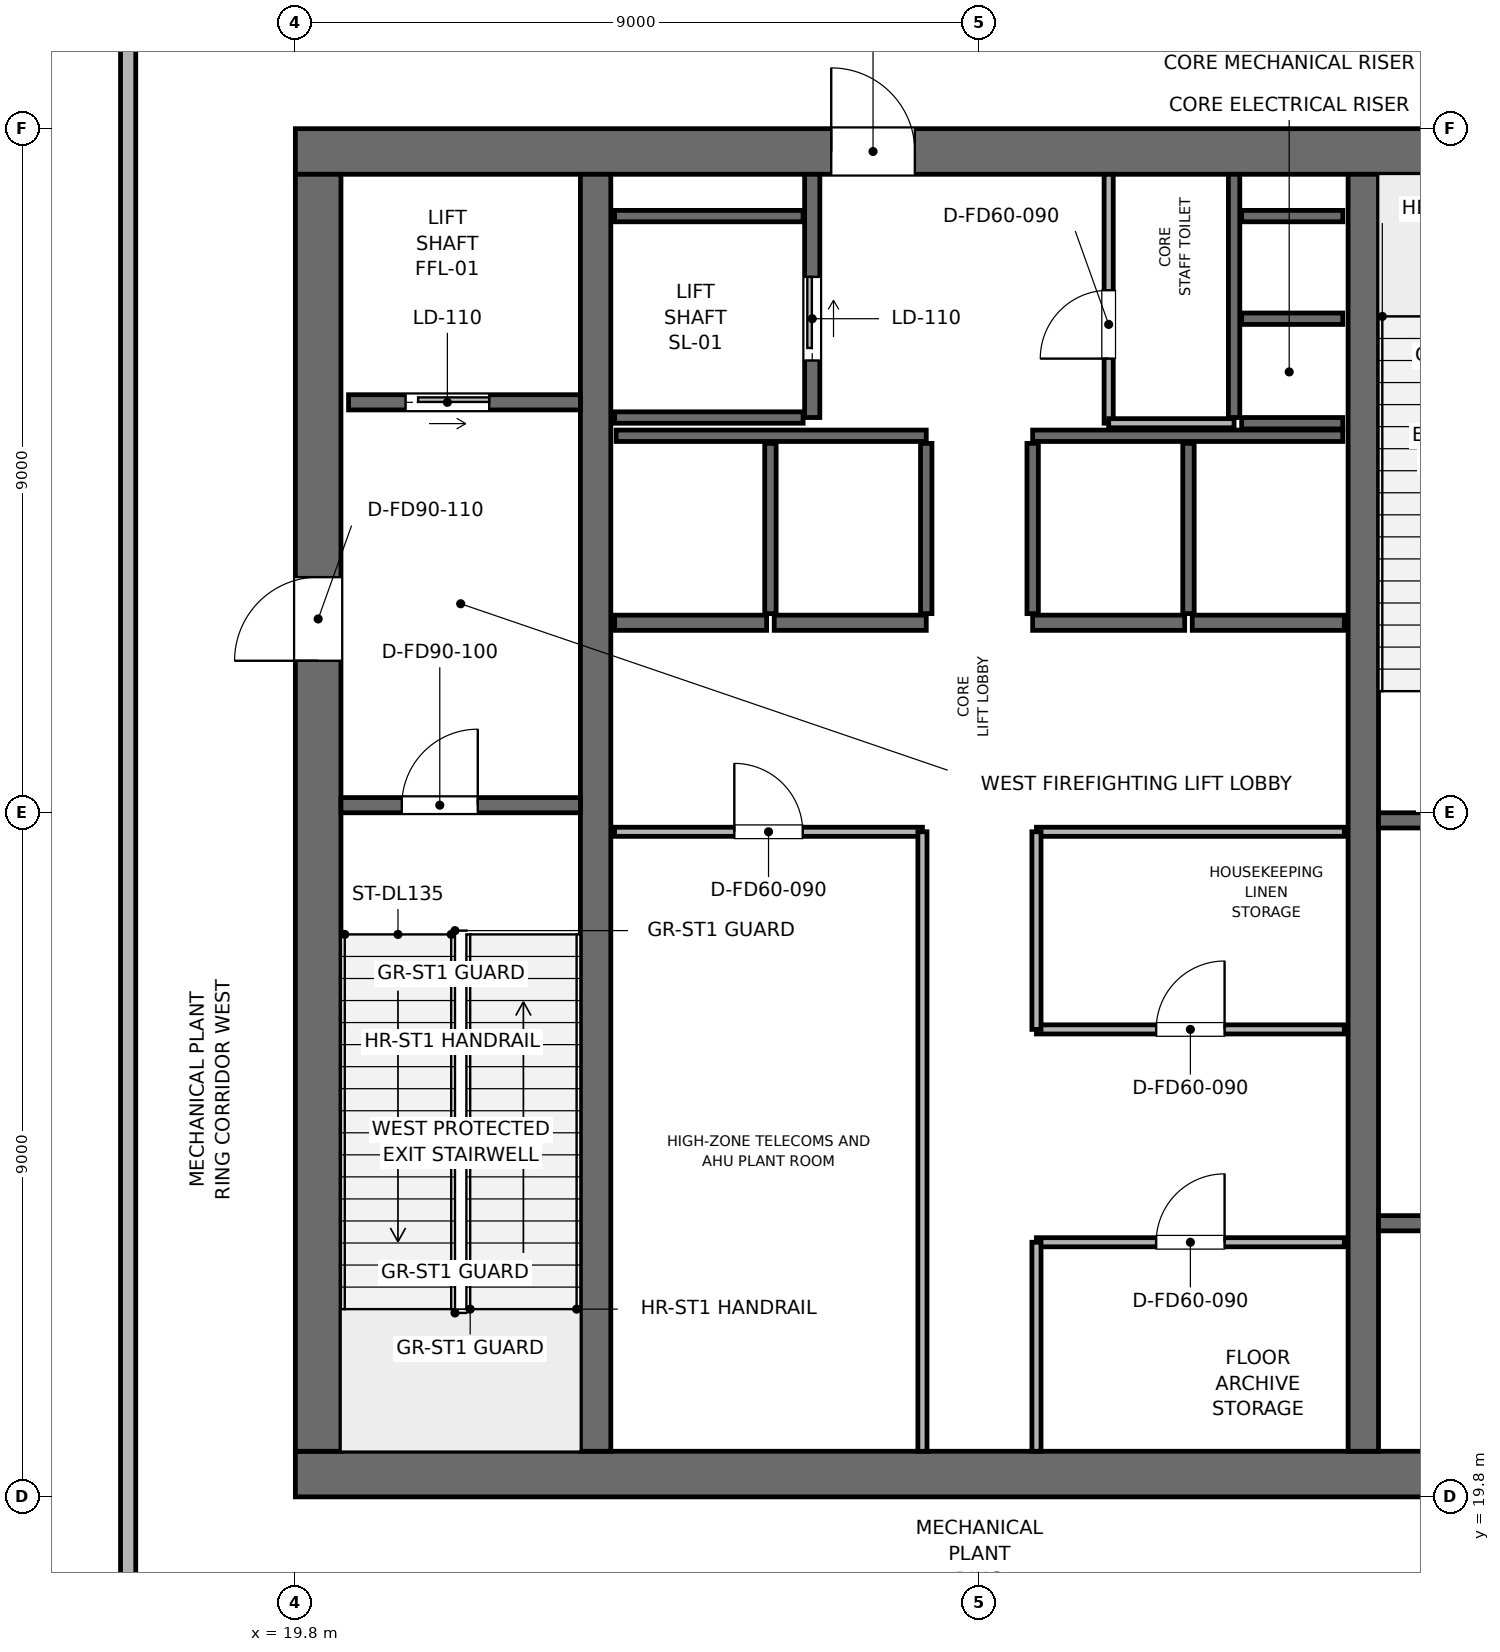
"""IFC4 building model, lengths in metres.
Left out: names, types, materials, properties, quantities, classifications, styles, units other than length and angle.
Written with IfcOpenShell. Run it as: python <this file> out.ifc"""

import sys

from ifc_helpers import new_model, si_unit, direction, frame, frame_2d, origin, place, context, subcontext, project, spatial, rectangle, extrude, element, fill, save


model = new_model("IFC4")
c1 = context("Model", 3, precision=1e-05, world=origin(), true_north=direction((0.0, 1.0)))
c2 = subcontext(c1, "Body", "Model", "MODEL_VIEW")
j1 = project(units=[si_unit("LENGTHUNIT", "METRE"), si_unit("PLANEANGLEUNIT", "RADIAN")], contexts=[c1])
p1 = place(None, origin())
s1 = spatial("IfcSite", under=j1, at=p1, CompositionType="ELEMENT")
p2 = place(p1, origin())
s2 = spatial("IfcBuilding", under=s1, at=p2, CompositionType="ELEMENT")
p3 = place(p2, frame((0.0, 0.0, 289.5)))
s3 = spatial("IfcBuildingStorey", under=s2, at=p3, CompositionType="ELEMENT", Elevation=289.5)
p4 = place(p3, frame((19.8, 20.1, 0.0), z_axis=(0.0, 0.0, 1.0), x_axis=(1.0, 0.0, 0.0)))
e1 = element("IfcWall", 1, at=p4, inside=s3, PredefinedType="SHEAR", context=c2, shape_type="SweptSolid", body=[
    extrude(rectangle(XDim=18.0, YDim=0.6, at=frame_2d((9.0, 0.0))), origin(), (0.0, 0.0, 1.0), 6.0),
])
p5 = place(p3, frame((19.8, 37.5, 0.0), z_axis=(0.0, 0.0, 1.0), x_axis=(1.0, 0.0, 0.0)))
e2 = element("IfcWall", 2, at=p5, inside=s3, PredefinedType="SHEAR", context=c2, shape_type="SweptSolid", body=[
    extrude(rectangle(XDim=18.0, YDim=0.6, at=frame_2d((9.0, 0.0))), origin(), (0.0, 0.0, 1.0), 6.0),
])
p6 = place(p5, frame((7.05, 0.0, 0.0)))
e3 = element("IfcOpeningElement", 3, at=p6, cuts=e2, PredefinedType="OPENING", context=c2, shape_type="SweptSolid", body=[
    extrude(rectangle(XDim=1.1, YDim=2.15, at=frame_2d((0.55, 1.075))), frame((0.0, 0.31, 0.0), z_axis=(0.0, -1.0, 0.0), x_axis=(1.0, 0.0, 0.0)), (0.0, 0.0, 1.0), 0.62),
])
p7 = place(p3, frame((20.1, 20.4, 0.0), z_axis=(0.0, 0.0, 1.0), x_axis=(0.0, 1.0, 0.0)))
e4 = element("IfcWall", 4, at=p7, inside=s3, PredefinedType="SHEAR", context=c2, shape_type="SweptSolid", body=[
    extrude(rectangle(XDim=16.8, YDim=0.6, at=frame_2d((8.4, 0.0))), origin(), (0.0, 0.0, 1.0), 6.0),
])
p8 = place(p7, frame((10.4, 0.0, 0.0)))
e5 = element("IfcOpeningElement", 5, at=p8, cuts=e4, PredefinedType="OPENING", context=c2, shape_type="SweptSolid", body=[
    extrude(rectangle(XDim=1.1, YDim=2.15, at=frame_2d((0.55, 1.075))), frame((0.0, 0.31, 0.0), z_axis=(0.0, -1.0, 0.0), x_axis=(1.0, 0.0, 0.0)), (0.0, 0.0, 1.0), 0.62),
])
for number, where, z_axis, x_axis in (
    (6, (23.75, 20.4, 0.0), (0.0, 0.0, 1.0), (0.0, 1.0, 0.0)),
    (7, (33.85, 20.4, 0.0), (0.0, 0.0, 1.0), (0.0, 1.0, 0.0)),
):
    element("IfcWall", number, at=place(p3, frame(where, z_axis=z_axis, x_axis=x_axis)), inside=s3, PredefinedType="SHEAR", context=c2, shape_type="SweptSolid", body=[
        extrude(rectangle(XDim=16.8, YDim=0.4, at=frame_2d((8.4, 0.0))), origin(), (0.0, 0.0, 1.0), 6.0),
    ])
p9 = place(p3, frame((20.4, 28.9, 0.0), z_axis=(0.0, 0.0, 1.0), x_axis=(1.0, 0.0, 0.0)))
e8 = element("IfcWall", 8, at=p9, inside=s3, PredefinedType="SHEAR", context=c2, shape_type="SweptSolid", body=[
    extrude(rectangle(XDim=3.15, YDim=0.2, at=frame_2d((1.575, 0.0))), origin(), (0.0, 0.0, 1.0), 5.76),
])
p10 = place(p9, frame((0.8, 0.0, 0.0)))
e9 = element("IfcOpeningElement", 9, at=p10, cuts=e8, PredefinedType="OPENING", context=c2, shape_type="SweptSolid", body=[
    extrude(rectangle(XDim=1.0, YDim=2.1, at=frame_2d((0.5, 1.05))), frame((0.0, 0.11, 0.0), z_axis=(0.0, -1.0, 0.0), x_axis=(1.0, 0.0, 0.0)), (0.0, 0.0, 1.0), 0.22),
])
p11 = place(p3, frame((34.05, 28.7, 0.0), z_axis=(0.0, 0.0, 1.0), x_axis=(1.0, 0.0, 0.0)))
e10 = element("IfcWall", 10, at=p11, inside=s3, PredefinedType="SHEAR", context=c2, shape_type="SweptSolid", body=[
    extrude(rectangle(XDim=3.15, YDim=0.2, at=frame_2d((1.575, 0.0))), origin(), (0.0, 0.0, 1.0), 5.76),
])
p12 = place(p11, frame((0.8, 0.0, 0.0)))
e11 = element("IfcOpeningElement", 11, at=p12, cuts=e10, PredefinedType="OPENING", context=c2, shape_type="SweptSolid", body=[
    extrude(rectangle(XDim=1.0, YDim=2.1, at=frame_2d((0.5, 1.05))), frame((0.0, 0.11, 0.0), z_axis=(0.0, -1.0, 0.0), x_axis=(1.0, 0.0, 0.0)), (0.0, 0.0, 1.0), 0.22),
])
p13 = place(p3, frame((32.15, 34.0, 0.0), z_axis=(0.0, 0.0, 1.0), x_axis=(0.0, 1.0, 0.0)))
e12 = element("IfcWall", 12, at=p13, inside=s3, PredefinedType="SHEAR", context=c2, shape_type="SweptSolid", body=[
    extrude(rectangle(XDim=3.2, YDim=0.15, at=frame_2d((1.6, 0.0))), origin(), (0.0, 0.0, 1.0), 5.76),
])
for number, where, z_axis, x_axis in (
    (13, (32.25, 33.925, 0.0), (0.0, 0.0, 1.0), (1.0, 0.0, 0.0)),
    (14, (32.25, 35.3, 0.0), (0.0, 0.0, 1.0), (1.0, 0.0, 0.0)),
):
    element("IfcWall", number, at=place(p3, frame(where, z_axis=z_axis, x_axis=x_axis)), inside=s3, PredefinedType="SHEAR", context=c2, shape_type="SweptSolid", body=[
        extrude(rectangle(XDim=1.33, YDim=0.15, at=frame_2d((0.665, 0.0))), origin(), (0.0, 0.0, 1.0), 5.76),
    ])
p14 = place(p3, frame((20.5, 34.2, 0.0), z_axis=(0.0, 0.0, 1.0), x_axis=(1.0, 0.0, 0.0)))
e15 = element("IfcWall", 15, at=p14, inside=s3, PredefinedType="SHEAR", context=c2, shape_type="SweptSolid", body=[
    extrude(rectangle(XDim=3.05, YDim=0.2, at=frame_2d((1.525, 0.0))), origin(), (0.0, 0.0, 1.0), 5.76),
])
p15 = place(p14, frame((0.75, 0.0, 0.0)))
e16 = element("IfcOpeningElement", 16, at=p15, cuts=e15, PredefinedType="OPENING", context=c2, shape_type="SweptSolid", body=[
    extrude(rectangle(XDim=1.1, YDim=2.15, at=frame_2d((0.55, 1.075))), frame((0.0, 0.11, 0.0), z_axis=(0.0, -1.0, 0.0), x_axis=(1.0, 0.0, 0.0)), (0.0, 0.0, 1.0), 0.22),
])
p16 = place(p3, frame((34.05, 23.4, 0.0), z_axis=(0.0, 0.0, 1.0), x_axis=(1.0, 0.0, 0.0)))
e17 = element("IfcWall", 17, at=p16, inside=s3, PredefinedType="SHEAR", context=c2, shape_type="SweptSolid", body=[
    extrude(rectangle(XDim=3.05, YDim=0.2, at=frame_2d((1.525, 0.0))), origin(), (0.0, 0.0, 1.0), 5.76),
])
p17 = place(p16, frame((1.2, 0.0, 0.0)))
e18 = element("IfcOpeningElement", 18, at=p17, cuts=e17, PredefinedType="OPENING", context=c2, shape_type="SweptSolid", body=[
    extrude(rectangle(XDim=1.1, YDim=2.15, at=frame_2d((0.55, 1.075))), frame((0.0, 0.11, 0.0), z_axis=(0.0, -1.0, 0.0), x_axis=(1.0, 0.0, 0.0)), (0.0, 0.0, 1.0), 0.22),
])
p18 = place(p3, frame((26.6, 34.0, 0.0), z_axis=(0.0, 0.0, 1.0), x_axis=(0.0, 1.0, 0.0)))
e19 = element("IfcWall", 19, at=p18, inside=s3, PredefinedType="SHEAR", context=c2, shape_type="SweptSolid", body=[
    extrude(rectangle(XDim=3.2, YDim=0.2, at=frame_2d((1.6, 0.0))), origin(), (0.0, 0.0, 1.0), 5.76),
])
p19 = place(p18, frame((0.75, 0.0, 0.0)))
e20 = element("IfcOpeningElement", 20, at=p19, cuts=e19, PredefinedType="OPENING", context=c2, shape_type="SweptSolid", body=[
    extrude(rectangle(XDim=1.1, YDim=2.15, at=frame_2d((0.55, 1.075))), frame((0.0, 0.11, 0.0), z_axis=(0.0, -1.0, 0.0), x_axis=(1.0, 0.0, 0.0)), (0.0, 0.0, 1.0), 0.22),
])
for number, where, z_axis, x_axis in (
    (21, (24.0, 34.0, 0.0), (0.0, 0.0, 1.0), (1.0, 0.0, 0.0)),
    (22, (24.0, 36.65, 0.0), (0.0, 0.0, 1.0), (1.0, 0.0, 0.0)),
):
    element("IfcWall", number, at=place(p3, frame(where, z_axis=z_axis, x_axis=x_axis)), inside=s3, PredefinedType="SHEAR", context=c2, shape_type="SweptSolid", body=[
        extrude(rectangle(XDim=2.48, YDim=0.15, at=frame_2d((1.24, 0.0))), origin(), (0.0, 0.0, 1.0), 5.76),
    ])
for number, where, z_axis, x_axis in (
    (23, (24.0, 31.3, 0.0), (0.0, 0.0, 1.0), (1.0, 0.0, 0.0)),
    (24, (26.1, 31.3, 0.0), (0.0, 0.0, 1.0), (1.0, 0.0, 0.0)),
    (25, (29.5, 31.3, 0.0), (0.0, 0.0, 1.0), (1.0, 0.0, 0.0)),
    (26, (31.6, 31.3, 0.0), (0.0, 0.0, 1.0), (1.0, 0.0, 0.0)),
):
    element("IfcWall", number, at=place(p3, frame(where, z_axis=z_axis, x_axis=x_axis)), inside=s3, PredefinedType="SHEAR", context=c2, shape_type="SweptSolid", body=[
        extrude(rectangle(XDim=2.0, YDim=0.2, at=frame_2d((1.0, 0.0))), origin(), (0.0, 0.0, 1.0), 5.76),
    ])
p20 = place(p3, frame((32.25, 36.65, 0.0), z_axis=(0.0, 0.0, 1.0), x_axis=(1.0, 0.0, 0.0)))
e27 = element("IfcWall", 27, at=p20, inside=s3, PredefinedType="SHEAR", context=c2, shape_type="SweptSolid", body=[
    extrude(rectangle(XDim=1.33, YDim=0.15, at=frame_2d((0.665, 0.0))), origin(), (0.0, 0.0, 1.0), 5.76),
])
for number, where, z_axis, x_axis in (
    (28, (24.02, 33.76, 0.0), (0.0, 0.0, 1.0), (1.0, 0.0, 0.0)),
    (29, (29.5, 33.76, 0.0), (0.0, 0.0, 1.0), (1.0, 0.0, 0.0)),
):
    element("IfcWall", number, at=place(p3, frame(where, z_axis=z_axis, x_axis=x_axis)), inside=s3, PredefinedType="SHEAR", context=c2, shape_type="SweptSolid", body=[
        extrude(rectangle(XDim=4.08, YDim=0.15, at=frame_2d((2.04, 0.0))), origin(), (0.0, 0.0, 1.0), 5.76),
    ])
for number, where, z_axis, x_axis in (
    (30, (26.05, 31.42, 0.0), (0.0, 0.0, 1.0), (0.0, 1.0, 0.0)),
    (31, (28.1, 31.42, 0.0), (0.0, 0.0, 1.0), (0.0, 1.0, 0.0)),
    (32, (29.5, 31.42, 0.0), (0.0, 0.0, 1.0), (0.0, 1.0, 0.0)),
    (33, (31.55, 31.42, 0.0), (0.0, 0.0, 1.0), (0.0, 1.0, 0.0)),
):
    element("IfcWall", number, at=place(p3, frame(where, z_axis=z_axis, x_axis=x_axis)), inside=s3, PredefinedType="SHEAR", context=c2, shape_type="SweptSolid", body=[
        extrude(rectangle(XDim=2.24, YDim=0.15, at=frame_2d((1.12, 0.0))), origin(), (0.0, 0.0, 1.0), 5.76),
    ])
p21 = place(p3, frame((30.5, 33.925, 0.0), z_axis=(0.0, 0.0, 1.0), x_axis=(0.0, 1.0, 0.0)))
e34 = element("IfcWall", 34, at=p21, inside=s3, PredefinedType="PARTITIONING", context=c2, shape_type="SweptSolid", body=[
    extrude(rectangle(XDim=3.275, YDim=0.12, at=frame_2d((1.637, 0.0))), origin(), (0.0, 0.0, 1.0), 5.76),
])
p22 = place(p21, frame((0.85, 0.0, 0.0)))
e35 = element("IfcOpeningElement", 35, at=p22, cuts=e34, PredefinedType="OPENING", context=c2, shape_type="SweptSolid", body=[
    extrude(rectangle(XDim=0.9, YDim=2.1, at=frame_2d((0.45, 1.05))), frame((0.0, 0.07, 0.0), z_axis=(0.0, -1.0, 0.0), x_axis=(1.0, 0.0, 0.0)), (0.0, 0.0, 1.0), 0.14),
])
p23 = place(p3, frame((30.5, 33.925, 0.0), z_axis=(0.0, 0.0, 1.0), x_axis=(1.0, 0.0, 0.0)))
e36 = element("IfcWall", 36, at=p23, inside=s3, PredefinedType="PARTITIONING", context=c2, shape_type="SweptSolid", body=[
    extrude(rectangle(XDim=1.65, YDim=0.12, at=frame_2d((0.825, 0.0))), origin(), (0.0, 0.0, 1.0), 5.76),
])
p24 = place(p3, frame((24.0, 28.55, 0.0), z_axis=(0.0, 0.0, 1.0), x_axis=(1.0, 0.0, 0.0)))
e37 = element("IfcWall", 37, at=p24, inside=s3, PredefinedType="PARTITIONING", context=c2, shape_type="SweptSolid", body=[
    extrude(rectangle(XDim=4.05, YDim=0.12, at=frame_2d((2.025, 0.0))), origin(), (0.0, 0.0, 1.0), 5.76),
])
p25 = place(p24, frame((1.575, 0.0, 0.0)))
e38 = element("IfcOpeningElement", 38, at=p25, cuts=e37, PredefinedType="OPENING", context=c2, shape_type="SweptSolid", body=[
    extrude(rectangle(XDim=0.9, YDim=2.1, at=frame_2d((0.45, 1.05))), frame((0.0, 0.07, 0.0), z_axis=(0.0, -1.0, 0.0), x_axis=(1.0, 0.0, 0.0)), (0.0, 0.0, 1.0), 0.14),
])
p26 = place(p3, frame((28.05, 20.4, 0.0), z_axis=(0.0, 0.0, 1.0), x_axis=(0.0, 1.0, 0.0)))
e39 = element("IfcWall", 39, at=p26, inside=s3, PredefinedType="PARTITIONING", context=c2, shape_type="SweptSolid", body=[
    extrude(rectangle(XDim=8.15, YDim=0.12, at=frame_2d((4.075, 0.0))), origin(), (0.0, 0.0, 1.0), 5.76),
])
p27 = place(p3, frame((29.55, 23.15, 0.0), z_axis=(0.0, 0.0, 1.0), x_axis=(1.0, 0.0, 0.0)))
e40 = element("IfcWall", 40, at=p27, inside=s3, PredefinedType="PARTITIONING", context=c2, shape_type="SweptSolid", body=[
    extrude(rectangle(XDim=4.05, YDim=0.12, at=frame_2d((2.025, 0.0))), origin(), (0.0, 0.0, 1.0), 5.76),
])
p28 = place(p27, frame((1.575, 0.0, 0.0)))
e41 = element("IfcOpeningElement", 41, at=p28, cuts=e40, PredefinedType="OPENING", context=c2, shape_type="SweptSolid", body=[
    extrude(rectangle(XDim=0.9, YDim=2.1, at=frame_2d((0.45, 1.05))), frame((0.0, 0.07, 0.0), z_axis=(0.0, -1.0, 0.0), x_axis=(1.0, 0.0, 0.0)), (0.0, 0.0, 1.0), 0.14),
])
p29 = place(p3, frame((29.55, 20.4, 0.0), z_axis=(0.0, 0.0, 1.0), x_axis=(0.0, 1.0, 0.0)))
e42 = element("IfcWall", 42, at=p29, inside=s3, PredefinedType="PARTITIONING", context=c2, shape_type="SweptSolid", body=[
    extrude(rectangle(XDim=2.75, YDim=0.12, at=frame_2d((1.375, 0.0))), origin(), (0.0, 0.0, 1.0), 5.76),
])
p30 = place(p3, frame((29.55, 25.95, 0.0), z_axis=(0.0, 0.0, 1.0), x_axis=(1.0, 0.0, 0.0)))
e43 = element("IfcWall", 43, at=p30, inside=s3, PredefinedType="PARTITIONING", context=c2, shape_type="SweptSolid", body=[
    extrude(rectangle(XDim=4.05, YDim=0.12, at=frame_2d((2.025, 0.0))), origin(), (0.0, 0.0, 1.0), 5.76),
])
p31 = place(p30, frame((1.575, 0.0, 0.0)))
e44 = element("IfcOpeningElement", 44, at=p31, cuts=e43, PredefinedType="OPENING", context=c2, shape_type="SweptSolid", body=[
    extrude(rectangle(XDim=0.9, YDim=2.1, at=frame_2d((0.45, 1.05))), frame((0.0, 0.07, 0.0), z_axis=(0.0, -1.0, 0.0), x_axis=(1.0, 0.0, 0.0)), (0.0, 0.0, 1.0), 0.14),
])
p32 = place(p3, frame((29.55, 28.55, 0.0), z_axis=(0.0, 0.0, 1.0), x_axis=(1.0, 0.0, 0.0)))
e45 = element("IfcWall", 45, at=p32, inside=s3, PredefinedType="PARTITIONING", context=c2, shape_type="SweptSolid", body=[
    extrude(rectangle(XDim=4.05, YDim=0.12, at=frame_2d((2.025, 0.0))), origin(), (0.0, 0.0, 1.0), 5.76),
])
p33 = place(p3, frame((29.55, 25.95, 0.0), z_axis=(0.0, 0.0, 1.0), x_axis=(0.0, 1.0, 0.0)))
e46 = element("IfcWall", 46, at=p33, inside=s3, PredefinedType="PARTITIONING", context=c2, shape_type="SweptSolid", body=[
    extrude(rectangle(XDim=2.6, YDim=0.12, at=frame_2d((1.3, 0.0))), origin(), (0.0, 0.0, 1.0), 5.76),
])
p34 = place(p3, frame((17.6, 17.6, 0.0), z_axis=(0.0, 0.0, 1.0), x_axis=(0.0, 1.0, 0.0)))
e47 = element("IfcWall", 47, at=p34, inside=s3, PredefinedType="PARTITIONING", context=c2, shape_type="SweptSolid", body=[
    extrude(rectangle(XDim=22.4, YDim=0.2, at=frame_2d((11.2, 0.0))), origin(), (0.0, 0.0, 1.0), 5.345),
])
p35 = place(p10, origin())
e48 = element("IfcDoor", 48, at=p35, inside=s3, OperationType="SINGLE_SWING_RIGHT", PredefinedType="DOOR", context=c2, shape_type="SweptSolid", body=[
    extrude(rectangle(XDim=1.0, YDim=2.1, at=frame_2d((0.5, 1.05))), frame((0.0, 0.025, 0.0), z_axis=(0.0, -1.0, 0.0), x_axis=(1.0, 0.0, 0.0)), (0.0, 0.0, 1.0), 0.05),
])
fill(e9, e48)
p36 = place(p15, origin())
e49 = element("IfcDoor", 49, at=p36, inside=s3, OperationType="SLIDING_TO_RIGHT", PredefinedType="DOOR", context=c2, shape_type="SweptSolid", body=[
    extrude(rectangle(XDim=1.1, YDim=2.15, at=frame_2d((0.55, 1.075))), frame((0.0, 0.025, 0.0), z_axis=(0.0, -1.0, 0.0), x_axis=(1.0, 0.0, 0.0)), (0.0, 0.0, 1.0), 0.05),
])
fill(e16, e49)
p37 = place(p19, origin())
e50 = element("IfcDoor", 50, at=p37, inside=s3, OperationType="SLIDING_TO_RIGHT", PredefinedType="DOOR", context=c2, shape_type="SweptSolid", body=[
    extrude(rectangle(XDim=1.1, YDim=2.15, at=frame_2d((0.55, 1.075))), frame((0.0, 0.025, 0.0), z_axis=(0.0, -1.0, 0.0), x_axis=(1.0, 0.0, 0.0)), (0.0, 0.0, 1.0), 0.05),
])
fill(e20, e50)
p38 = place(p22, origin())
e51 = element("IfcDoor", 51, at=p38, inside=s3, OperationType="SINGLE_SWING_LEFT", PredefinedType="DOOR", context=c2, shape_type="SweptSolid", body=[
    extrude(rectangle(XDim=0.9, YDim=2.1, at=frame_2d((0.45, 1.05))), frame((0.0, 0.025, 0.0), z_axis=(0.0, -1.0, 0.0), x_axis=(1.0, 0.0, 0.0)), (0.0, 0.0, 1.0), 0.05),
])
fill(e35, e51)
p39 = place(p25, origin())
e52 = element("IfcDoor", 52, at=p39, inside=s3, OperationType="SINGLE_SWING_LEFT", PredefinedType="DOOR", context=c2, shape_type="SweptSolid", body=[
    extrude(rectangle(XDim=0.9, YDim=2.1, at=frame_2d((0.45, 1.05))), frame((0.0, 0.025, 0.0), z_axis=(0.0, -1.0, 0.0), x_axis=(1.0, 0.0, 0.0)), (0.0, 0.0, 1.0), 0.05),
])
fill(e38, e52)
p40 = place(p28, origin())
e53 = element("IfcDoor", 53, at=p40, inside=s3, OperationType="SINGLE_SWING_RIGHT", PredefinedType="DOOR", context=c2, shape_type="SweptSolid", body=[
    extrude(rectangle(XDim=0.9, YDim=2.1, at=frame_2d((0.45, 1.05))), frame((0.0, 0.025, 0.0), z_axis=(0.0, -1.0, 0.0), x_axis=(1.0, 0.0, 0.0)), (0.0, 0.0, 1.0), 0.05),
])
fill(e41, e53)
p41 = place(p31, origin())
e54 = element("IfcDoor", 54, at=p41, inside=s3, OperationType="SINGLE_SWING_RIGHT", PredefinedType="DOOR", context=c2, shape_type="SweptSolid", body=[
    extrude(rectangle(XDim=0.9, YDim=2.1, at=frame_2d((0.45, 1.05))), frame((0.0, 0.025, 0.0), z_axis=(0.0, -1.0, 0.0), x_axis=(1.0, 0.0, 0.0)), (0.0, 0.0, 1.0), 0.05),
])
fill(e44, e54)
p42 = place(p8, origin())
e55 = element("IfcDoor", 55, at=p42, inside=s3, OperationType="SINGLE_SWING_LEFT", PredefinedType="DOOR", context=c2, shape_type="SweptSolid", body=[
    extrude(rectangle(XDim=1.1, YDim=2.15, at=frame_2d((0.55, 1.075))), frame((0.0, 0.025, 0.0), z_axis=(0.0, -1.0, 0.0), x_axis=(1.0, 0.0, 0.0)), (0.0, 0.0, 1.0), 0.05),
])
fill(e5, e55)
p43 = place(p6, origin())
e56 = element("IfcDoor", 56, at=p43, inside=s3, OperationType="SINGLE_SWING_LEFT", PredefinedType="DOOR", context=c2, shape_type="SweptSolid", body=[
    extrude(rectangle(XDim=1.1, YDim=2.15, at=frame_2d((0.55, 1.075))), frame((0.0, 0.025, 0.0), z_axis=(0.0, -1.0, 0.0), x_axis=(1.0, 0.0, 0.0)), (0.0, 0.0, 1.0), 0.05),
])
fill(e3, e56)
save(model, sys.argv[1])
